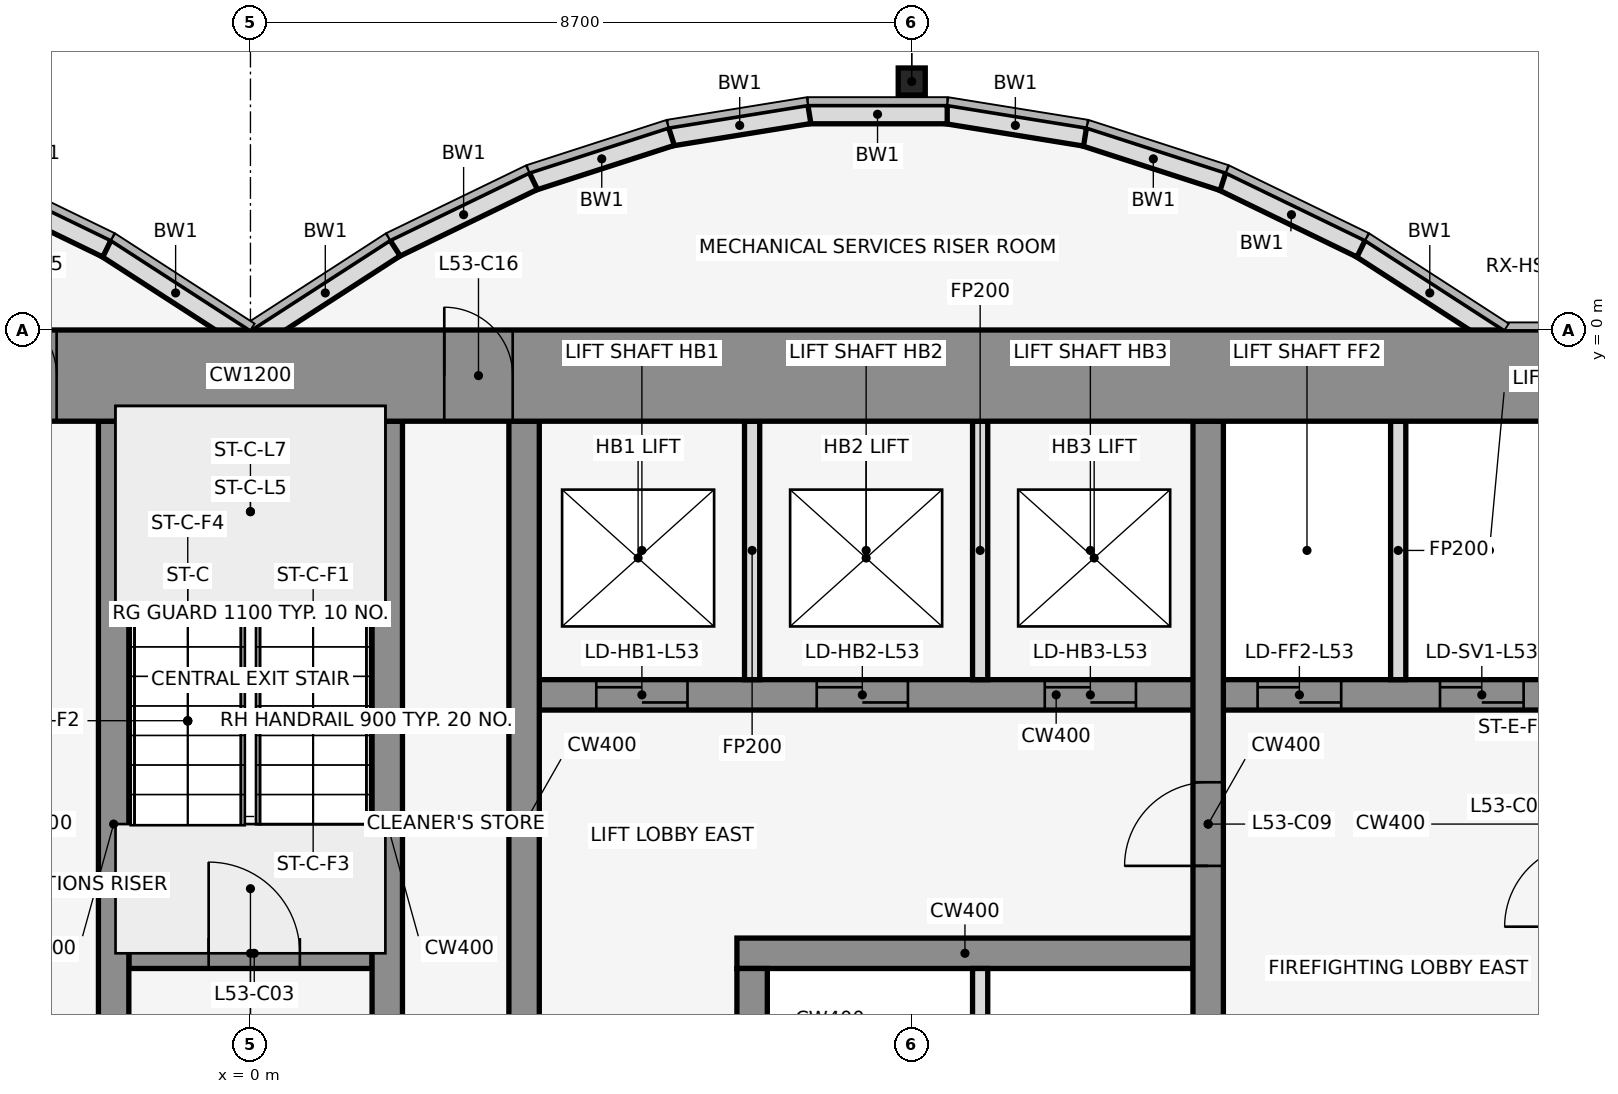
"""IFC4 building model, lengths in metres.
Left out: names, types, materials, properties, quantities, classifications, styles, units other than length and angle.
Written with IfcOpenShell. Run it as: python <this file> out.ifc"""

import sys

from ifc_helpers import new_model, si_unit, direction, frame, frame_2d, origin, origin_2d, place, context, subcontext, project, spatial, rectangle, hollow_rectangle, extrude, element, fill, save


model = new_model("IFC4")
c1 = context("Model", 3, precision=1e-05, world=origin(), true_north=direction((0.0, 1.0)))
c2 = subcontext(c1, "Body", "Model", "MODEL_VIEW")
j1 = project(units=[si_unit("LENGTHUNIT", "METRE"), si_unit("PLANEANGLEUNIT", "RADIAN")], contexts=[c1])
p1 = place(None, origin())
s1 = spatial("IfcSite", under=j1, at=p1, CompositionType="ELEMENT")
p2 = place(p1, origin())
s2 = spatial("IfcBuilding", under=s1, at=p2, CompositionType="ELEMENT")
p3 = place(p2, frame((0.0, 0.0, 236.0)))
s3 = spatial("IfcBuildingStorey", under=s2, at=p3, CompositionType="ELEMENT", Elevation=236.0)
p4 = place(p3, frame((8.7, 3.269, 0.0), z_axis=(0.0, 0.0, 1.0), x_axis=(1.0, 0.0, 0.0)))
e1 = element("IfcColumn", 1, at=p4, inside=s3, PredefinedType="COLUMN", context=c2, shape_type="SweptSolid", body=[
    extrude(hollow_rectangle(XDim=0.356, YDim=0.356, WallThickness=0.012, at=origin_2d()), origin(), (0.0, 0.0, 1.0), 5.4),
])
p5 = place(p3, frame((16.432, -0.105, 0.0), z_axis=(0.0, 0.0, 1.0), x_axis=(-0.83981312244, 0.542875602121, 0.0)))
e2 = element("IfcWall", 2, at=p5, inside=s3, PredefinedType="STANDARD", context=c2, shape_type="SweptSolid", body=[
    extrude(rectangle(XDim=2.183, YDim=0.25, at=frame_2d((1.091, 0.0))), origin(), (0.0, 0.0, 1.0), 5.25),
])
p6 = place(p3, frame((14.612, 1.073, 0.0), z_axis=(0.0, 0.0, 1.0), x_axis=(-0.89982408427, 0.436252928206, 0.0)))
e3 = element("IfcWall", 3, at=p6, inside=s3, PredefinedType="STANDARD", context=c2, shape_type="SweptSolid", body=[
    extrude(rectangle(XDim=2.038, YDim=0.25, at=frame_2d((1.019, 0.0))), origin(), (0.0, 0.0, 1.0), 5.25),
])
p7 = place(p3, frame((12.795, 1.955, 0.0), z_axis=(0.0, 0.0, 1.0), x_axis=(-0.951495806175, 0.307661714928, 0.0)))
e4 = element("IfcWall", 4, at=p7, inside=s3, PredefinedType="STANDARD", context=c2, shape_type="SweptSolid", body=[
    extrude(rectangle(XDim=1.927, YDim=0.25, at=frame_2d((0.963, 0.0))), origin(), (0.0, 0.0, 1.0), 5.25),
])
p8 = place(p3, frame((10.98, 2.543, 0.0), z_axis=(0.0, 0.0, 1.0), x_axis=(-0.987181718931, 0.159600293885, 0.0)))
e5 = element("IfcWall", 5, at=p8, inside=s3, PredefinedType="STANDARD", context=c2, shape_type="SweptSolid", body=[
    extrude(rectangle(XDim=1.857, YDim=0.25, at=frame_2d((0.929, 0.0))), origin(), (0.0, 0.0, 1.0), 5.25),
])
p9 = place(p3, frame((9.167, 2.838, 0.0), z_axis=(0.0, 0.0, 1.0), x_axis=(-1.0, 0.0, 0.0)))
e6 = element("IfcWall", 6, at=p9, inside=s3, PredefinedType="STANDARD", context=c2, shape_type="SweptSolid", body=[
    extrude(rectangle(XDim=1.833, YDim=0.25, at=frame_2d((0.917, 0.0))), origin(), (0.0, 0.0, 1.0), 5.25),
])
p10 = place(p3, frame((7.353, 2.84, 0.0), z_axis=(0.0, 0.0, 1.0), x_axis=(-0.987181718931, -0.159600293885, 0.0)))
e7 = element("IfcWall", 7, at=p10, inside=s3, PredefinedType="STANDARD", context=c2, shape_type="SweptSolid", body=[
    extrude(rectangle(XDim=1.857, YDim=0.25, at=frame_2d((0.929, 0.0))), origin(), (0.0, 0.0, 1.0), 5.25),
])
p11 = place(p3, frame((5.538, 2.548, 0.0), z_axis=(0.0, 0.0, 1.0), x_axis=(-0.951495806175, -0.307661714928, 0.0)))
e8 = element("IfcWall", 8, at=p11, inside=s3, PredefinedType="STANDARD", context=c2, shape_type="SweptSolid", body=[
    extrude(rectangle(XDim=1.927, YDim=0.25, at=frame_2d((0.963, 0.0))), origin(), (0.0, 0.0, 1.0), 5.25),
])
p12 = place(p3, frame((3.721, 1.962, 0.0), z_axis=(0.0, 0.0, 1.0), x_axis=(-0.89982408427, -0.436252928206, 0.0)))
e9 = element("IfcWall", 9, at=p12, inside=s3, PredefinedType="STANDARD", context=c2, shape_type="SweptSolid", body=[
    extrude(rectangle(XDim=2.038, YDim=0.25, at=frame_2d((1.019, 0.0))), origin(), (0.0, 0.0, 1.0), 5.25),
])
for number, where, z_axis, x_axis in (
    (10, (1.901, 1.08, 0.0), (0.0, 0.0, 1.0), (-0.84, -0.543, 0.0)),
    (11, (-0.068, -0.105, 0.0), (0.0, 0.0, 1.0), (-0.84, 0.543, 0.0)),
):
    element("IfcWall", number, at=place(p3, frame(where, z_axis=z_axis, x_axis=x_axis)), inside=s3, PredefinedType="STANDARD", context=c2, shape_type="SweptSolid", body=[
        extrude(rectangle(XDim=2.183, YDim=0.25, at=frame_2d((1.091, 0.0))), origin(), (0.0, 0.0, 1.0), 5.25),
    ])
p13 = place(p3, frame((-1.888, 1.073, 0.0), z_axis=(0.0, 0.0, 1.0), x_axis=(-0.89982408427, 0.436252928206, 0.0)))
e12 = element("IfcWall", 12, at=p13, inside=s3, PredefinedType="STANDARD", context=c2, shape_type="SweptSolid", body=[
    extrude(rectangle(XDim=2.038, YDim=0.25, at=frame_2d((1.019, 0.0))), origin(), (0.0, 0.0, 1.0), 5.25),
])
p14 = place(p3, frame((-1.6, -8.2, 0.0), z_axis=(0.0, 0.0, 1.0), x_axis=(1.0, 0.0, 0.0)))
e13 = element("IfcWall", 13, at=p14, inside=s3, PredefinedType="SHEAR", context=c2, shape_type="SweptSolid", body=[
    extrude(rectangle(XDim=3.2, YDim=0.4, at=frame_2d((1.6, 0.0))), origin(), (0.0, 0.0, 1.0), 5.4),
])
p15 = place(p14, frame((1.05, 0.0, 0.0)))
e14 = element("IfcOpeningElement", 14, at=p15, cuts=e13, PredefinedType="OPENING", context=c2, shape_type="SweptSolid", body=[
    extrude(rectangle(XDim=1.2, YDim=2.1, at=frame_2d((0.6, 1.05))), frame((0.0, 0.212, 0.0), z_axis=(0.0, -1.0, 0.0), x_axis=(1.0, 0.0, 0.0)), (0.0, 0.0, 1.0), 0.424),
])
p16 = place(p3, frame((6.4, -8.2, 0.0), z_axis=(0.0, 0.0, 1.0), x_axis=(1.0, 0.0, 0.0)))
e15 = element("IfcWall", 15, at=p16, inside=s3, PredefinedType="SHEAR", context=c2, shape_type="SweptSolid", body=[
    extrude(rectangle(XDim=6.0, YDim=0.4, at=frame_2d((3.0, 0.0))), origin(), (0.0, 0.0, 1.0), 5.4),
])
p17 = place(p3, frame((3.8, -4.8, 0.0), z_axis=(0.0, 0.0, 1.0), x_axis=(1.0, 0.0, 0.0)))
e16 = element("IfcWall", 16, at=p17, inside=s3, PredefinedType="SHEAR", context=c2, shape_type="SweptSolid", body=[
    extrude(rectangle(XDim=13.6, YDim=0.4, at=frame_2d((6.8, 0.0))), origin(), (0.0, 0.0, 1.0), 5.4),
])
p18 = place(p17, frame((0.75, 0.0, 0.0)))
e17 = element("IfcOpeningElement", 17, at=p18, cuts=e16, PredefinedType="OPENING", context=c2, shape_type="SweptSolid", body=[
    extrude(rectangle(XDim=1.2, YDim=2.1, at=frame_2d((0.6, 1.05))), frame((0.0, 0.212, 0.0), z_axis=(0.0, -1.0, 0.0), x_axis=(1.0, 0.0, 0.0)), (0.0, 0.0, 1.0), 0.424),
])
p19 = place(p17, frame((3.65, 0.0, 0.0)))
e18 = element("IfcOpeningElement", 18, at=p19, cuts=e16, PredefinedType="OPENING", context=c2, shape_type="SweptSolid", body=[
    extrude(rectangle(XDim=1.2, YDim=2.1, at=frame_2d((0.6, 1.05))), frame((0.0, 0.212, 0.0), z_axis=(0.0, -1.0, 0.0), x_axis=(1.0, 0.0, 0.0)), (0.0, 0.0, 1.0), 0.424),
])
p20 = place(p17, frame((6.65, 0.0, 0.0)))
e19 = element("IfcOpeningElement", 19, at=p20, cuts=e16, PredefinedType="OPENING", context=c2, shape_type="SweptSolid", body=[
    extrude(rectangle(XDim=1.2, YDim=2.1, at=frame_2d((0.6, 1.05))), frame((0.0, 0.212, 0.0), z_axis=(0.0, -1.0, 0.0), x_axis=(1.0, 0.0, 0.0)), (0.0, 0.0, 1.0), 0.424),
])
p21 = place(p17, frame((9.45, 0.0, 0.0)))
e20 = element("IfcOpeningElement", 20, at=p21, cuts=e16, PredefinedType="OPENING", context=c2, shape_type="SweptSolid", body=[
    extrude(rectangle(XDim=1.1, YDim=2.1, at=frame_2d((0.55, 1.05))), frame((0.0, 0.212, 0.0), z_axis=(0.0, -1.0, 0.0), x_axis=(1.0, 0.0, 0.0)), (0.0, 0.0, 1.0), 0.424),
])
p22 = place(p17, frame((11.85, 0.0, 0.0)))
e21 = element("IfcOpeningElement", 21, at=p22, cuts=e16, PredefinedType="OPENING", context=c2, shape_type="SweptSolid", body=[
    extrude(rectangle(XDim=1.1, YDim=2.1, at=frame_2d((0.55, 1.05))), frame((0.0, 0.212, 0.0), z_axis=(0.0, -1.0, 0.0), x_axis=(1.0, 0.0, 0.0)), (0.0, 0.0, 1.0), 0.424),
])
for number, where, z_axis, x_axis in (
    (22, (-1.8, -11.8, 0.0), (0.0, 0.0, 1.0), (0.0, 1.0, 0.0)),
    (23, (1.8, -11.8, 0.0), (0.0, 0.0, 1.0), (0.0, 1.0, 0.0)),
):
    element("IfcWall", number, at=place(p3, frame(where, z_axis=z_axis, x_axis=x_axis)), inside=s3, PredefinedType="SHEAR", context=c2, shape_type="SweptSolid", body=[
        extrude(rectangle(XDim=10.6, YDim=0.4, at=frame_2d((5.3, 0.0))), origin(), (0.0, 0.0, 1.0), 5.4),
    ])
p23 = place(p3, frame((3.6, -11.8, 0.0), z_axis=(0.0, 0.0, 1.0), x_axis=(0.0, 1.0, 0.0)))
e24 = element("IfcWall", 24, at=p23, inside=s3, PredefinedType="SHEAR", context=c2, shape_type="SweptSolid", body=[
    extrude(rectangle(XDim=10.6, YDim=0.4, at=frame_2d((5.3, 0.0))), origin(), (0.0, 0.0, 1.0), 5.4),
])
p24 = place(p23, frame((1.35, 0.0, 0.0)))
e25 = element("IfcOpeningElement", 25, at=p24, cuts=e24, PredefinedType="OPENING", context=c2, shape_type="SweptSolid", body=[
    extrude(rectangle(XDim=0.9, YDim=2.1, at=frame_2d((0.45, 1.05))), frame((0.0, 0.212, 0.0), z_axis=(0.0, -1.0, 0.0), x_axis=(1.0, 0.0, 0.0)), (0.0, 0.0, 1.0), 0.424),
])
p25 = place(p3, frame((6.6, -11.8, 0.0), z_axis=(0.0, 0.0, 1.0), x_axis=(0.0, 1.0, 0.0)))
e26 = element("IfcWall", 26, at=p25, inside=s3, PredefinedType="SHEAR", context=c2, shape_type="SweptSolid", body=[
    extrude(rectangle(XDim=3.4, YDim=0.4, at=frame_2d((1.7, 0.0))), origin(), (0.0, 0.0, 1.0), 5.4),
])
p26 = place(p25, frame((1.15, 0.0, 0.0)))
e27 = element("IfcOpeningElement", 27, at=p26, cuts=e26, PredefinedType="OPENING", context=c2, shape_type="SweptSolid", body=[
    extrude(rectangle(XDim=1.2, YDim=2.1, at=frame_2d((0.6, 1.05))), frame((0.0, 0.212, 0.0), z_axis=(0.0, -1.0, 0.0), x_axis=(1.0, 0.0, 0.0)), (0.0, 0.0, 1.0), 0.424),
])
for number, where, z_axis, x_axis in (
    (28, (6.6, -4.6, 0.0), (0.0, 0.0, 1.0), (0.0, 1.0, 0.0)),
    (29, (9.6, -11.8, 0.0), (0.0, 0.0, 1.0), (0.0, 1.0, 0.0)),
    (30, (9.6, -4.6, 0.0), (0.0, 0.0, 1.0), (0.0, 1.0, 0.0)),
):
    element("IfcWall", number, at=place(p3, frame(where, z_axis=z_axis, x_axis=x_axis)), inside=s3, PredefinedType="PARTITIONING", context=c2, shape_type="SweptSolid", body=[
        extrude(rectangle(XDim=3.4, YDim=0.2, at=frame_2d((1.7, 0.0))), origin(), (0.0, 0.0, 1.0), 4.318),
    ])
p27 = place(p3, frame((12.6, -11.8, 0.0), z_axis=(0.0, 0.0, 1.0), x_axis=(0.0, 1.0, 0.0)))
e31 = element("IfcWall", 31, at=p27, inside=s3, PredefinedType="SHEAR", context=c2, shape_type="SweptSolid", body=[
    extrude(rectangle(XDim=10.6, YDim=0.4, at=frame_2d((5.3, 0.0))), origin(), (0.0, 0.0, 1.0), 5.4),
])
p28 = place(p27, frame((1.25, 0.0, 0.0)))
e32 = element("IfcOpeningElement", 32, at=p28, cuts=e31, PredefinedType="OPENING", context=c2, shape_type="SweptSolid", body=[
    extrude(rectangle(XDim=1.2, YDim=2.1, at=frame_2d((0.6, 1.05))), frame((0.0, 0.212, 0.0), z_axis=(0.0, -1.0, 0.0), x_axis=(1.0, 0.0, 0.0)), (0.0, 0.0, 1.0), 0.424),
])
p29 = place(p27, frame((4.75, 0.0, 0.0)))
e33 = element("IfcOpeningElement", 33, at=p29, cuts=e31, PredefinedType="OPENING", context=c2, shape_type="SweptSolid", body=[
    extrude(rectangle(XDim=1.1, YDim=2.1, at=frame_2d((0.55, 1.05))), frame((0.0, 0.212, 0.0), z_axis=(0.0, -1.0, 0.0), x_axis=(1.0, 0.0, 0.0)), (0.0, 0.0, 1.0), 0.424),
])
p30 = place(p3, frame((15.1, -4.6, 0.0), z_axis=(0.0, 0.0, 1.0), x_axis=(0.0, 1.0, 0.0)))
e34 = element("IfcWall", 34, at=p30, inside=s3, PredefinedType="PARTITIONING", context=c2, shape_type="SweptSolid", body=[
    extrude(rectangle(XDim=3.4, YDim=0.2, at=frame_2d((1.7, 0.0))), origin(), (0.0, 0.0, 1.0), 4.318),
])
p31 = place(p3, frame((-22.0, -0.6, 0.0), z_axis=(0.0, 0.0, 1.0), x_axis=(1.0, 0.0, 0.0)))
e35 = element("IfcWall", 35, at=p31, inside=s3, PredefinedType="SHEAR", context=c2, shape_type="SweptSolid", body=[
    extrude(rectangle(XDim=44.0, YDim=1.2, at=frame_2d((22.0, 0.0))), origin(), (0.0, 0.0, 1.0), 5.4),
])
p32 = place(p31, frame((18.55, 0.0, 0.0)))
e36 = element("IfcOpeningElement", 36, at=p32, cuts=e35, PredefinedType="OPENING", context=c2, shape_type="SweptSolid", body=[
    extrude(rectangle(XDim=0.9, YDim=2.1, at=frame_2d((0.45, 1.05))), frame((0.0, 0.612, 0.0), z_axis=(0.0, -1.0, 0.0), x_axis=(1.0, 0.0, 0.0)), (0.0, 0.0, 1.0), 1.224),
])
p33 = place(p31, frame((24.55, 0.0, 0.0)))
e37 = element("IfcOpeningElement", 37, at=p33, cuts=e35, PredefinedType="OPENING", context=c2, shape_type="SweptSolid", body=[
    extrude(rectangle(XDim=0.9, YDim=2.1, at=frame_2d((0.45, 1.05))), frame((0.0, 0.612, 0.0), z_axis=(0.0, -1.0, 0.0), x_axis=(1.0, 0.0, 0.0)), (0.0, 0.0, 1.0), 1.224),
])
p34 = place(p15, origin())
e38 = element("IfcDoor", 38, at=p34, inside=s3, OperationType="SINGLE_SWING_LEFT", PredefinedType="DOOR", context=c2, shape_type="SweptSolid", body=[
    extrude(rectangle(XDim=1.2, YDim=2.1, at=frame_2d((0.6, 1.05))), frame((0.0, 0.025, 0.0), z_axis=(0.0, -1.0, 0.0), x_axis=(1.0, 0.0, 0.0)), (0.0, 0.0, 1.0), 0.05),
])
fill(e14, e38)
p35 = place(p18, origin())
e39 = element("IfcDoor", 39, at=p35, inside=s3, OperationType="DOUBLE_DOOR_SLIDING", PredefinedType="DOOR", context=c2, shape_type="SweptSolid", body=[
    extrude(rectangle(XDim=1.2, YDim=2.1, at=frame_2d((0.6, 1.05))), frame((0.0, 0.025, 0.0), z_axis=(0.0, -1.0, 0.0), x_axis=(1.0, 0.0, 0.0)), (0.0, 0.0, 1.0), 0.05),
])
fill(e17, e39)
p36 = place(p19, origin())
e40 = element("IfcDoor", 40, at=p36, inside=s3, OperationType="DOUBLE_DOOR_SLIDING", PredefinedType="DOOR", context=c2, shape_type="SweptSolid", body=[
    extrude(rectangle(XDim=1.2, YDim=2.1, at=frame_2d((0.6, 1.05))), frame((0.0, 0.025, 0.0), z_axis=(0.0, -1.0, 0.0), x_axis=(1.0, 0.0, 0.0)), (0.0, 0.0, 1.0), 0.05),
])
fill(e18, e40)
p37 = place(p20, origin())
e41 = element("IfcDoor", 41, at=p37, inside=s3, OperationType="DOUBLE_DOOR_SLIDING", PredefinedType="DOOR", context=c2, shape_type="SweptSolid", body=[
    extrude(rectangle(XDim=1.2, YDim=2.1, at=frame_2d((0.6, 1.05))), frame((0.0, 0.025, 0.0), z_axis=(0.0, -1.0, 0.0), x_axis=(1.0, 0.0, 0.0)), (0.0, 0.0, 1.0), 0.05),
])
fill(e19, e41)
p38 = place(p21, origin())
e42 = element("IfcDoor", 42, at=p38, inside=s3, OperationType="DOUBLE_DOOR_SLIDING", PredefinedType="DOOR", context=c2, shape_type="SweptSolid", body=[
    extrude(rectangle(XDim=1.1, YDim=2.1, at=frame_2d((0.55, 1.05))), frame((0.0, 0.025, 0.0), z_axis=(0.0, -1.0, 0.0), x_axis=(1.0, 0.0, 0.0)), (0.0, 0.0, 1.0), 0.05),
])
fill(e20, e42)
p39 = place(p22, origin())
e43 = element("IfcDoor", 43, at=p39, inside=s3, OperationType="DOUBLE_DOOR_SLIDING", PredefinedType="DOOR", context=c2, shape_type="SweptSolid", body=[
    extrude(rectangle(XDim=1.1, YDim=2.1, at=frame_2d((0.55, 1.05))), frame((0.0, 0.025, 0.0), z_axis=(0.0, -1.0, 0.0), x_axis=(1.0, 0.0, 0.0)), (0.0, 0.0, 1.0), 0.05),
])
fill(e21, e43)
p40 = place(p29, frame((1.1, 0.0, 0.0), z_axis=(0.0, 0.0, 1.0), x_axis=(-1.0, 0.0, 0.0)))
e44 = element("IfcDoor", 44, at=p40, inside=s3, OperationType="SINGLE_SWING_RIGHT", PredefinedType="DOOR", context=c2, shape_type="SweptSolid", body=[
    extrude(rectangle(XDim=1.1, YDim=2.1, at=frame_2d((0.55, 1.05))), frame((0.0, 0.025, 0.0), z_axis=(0.0, -1.0, 0.0), x_axis=(1.0, 0.0, 0.0)), (0.0, 0.0, 1.0), 0.05),
])
fill(e33, e44)
p41 = place(p32, origin())
e45 = element("IfcDoor", 45, at=p41, inside=s3, OperationType="SINGLE_SWING_LEFT", PredefinedType="DOOR", context=c2, shape_type="SweptSolid", body=[
    extrude(rectangle(XDim=0.9, YDim=2.1, at=frame_2d((0.45, 1.05))), frame((0.0, 0.025, 0.0), z_axis=(0.0, -1.0, 0.0), x_axis=(1.0, 0.0, 0.0)), (0.0, 0.0, 1.0), 0.05),
])
fill(e36, e45)
p42 = place(p33, origin())
e46 = element("IfcDoor", 46, at=p42, inside=s3, OperationType="SINGLE_SWING_LEFT", PredefinedType="DOOR", context=c2, shape_type="SweptSolid", body=[
    extrude(rectangle(XDim=0.9, YDim=2.1, at=frame_2d((0.45, 1.05))), frame((0.0, 0.025, 0.0), z_axis=(0.0, -1.0, 0.0), x_axis=(1.0, 0.0, 0.0)), (0.0, 0.0, 1.0), 0.05),
])
fill(e37, e46)
save(model, sys.argv[1])
